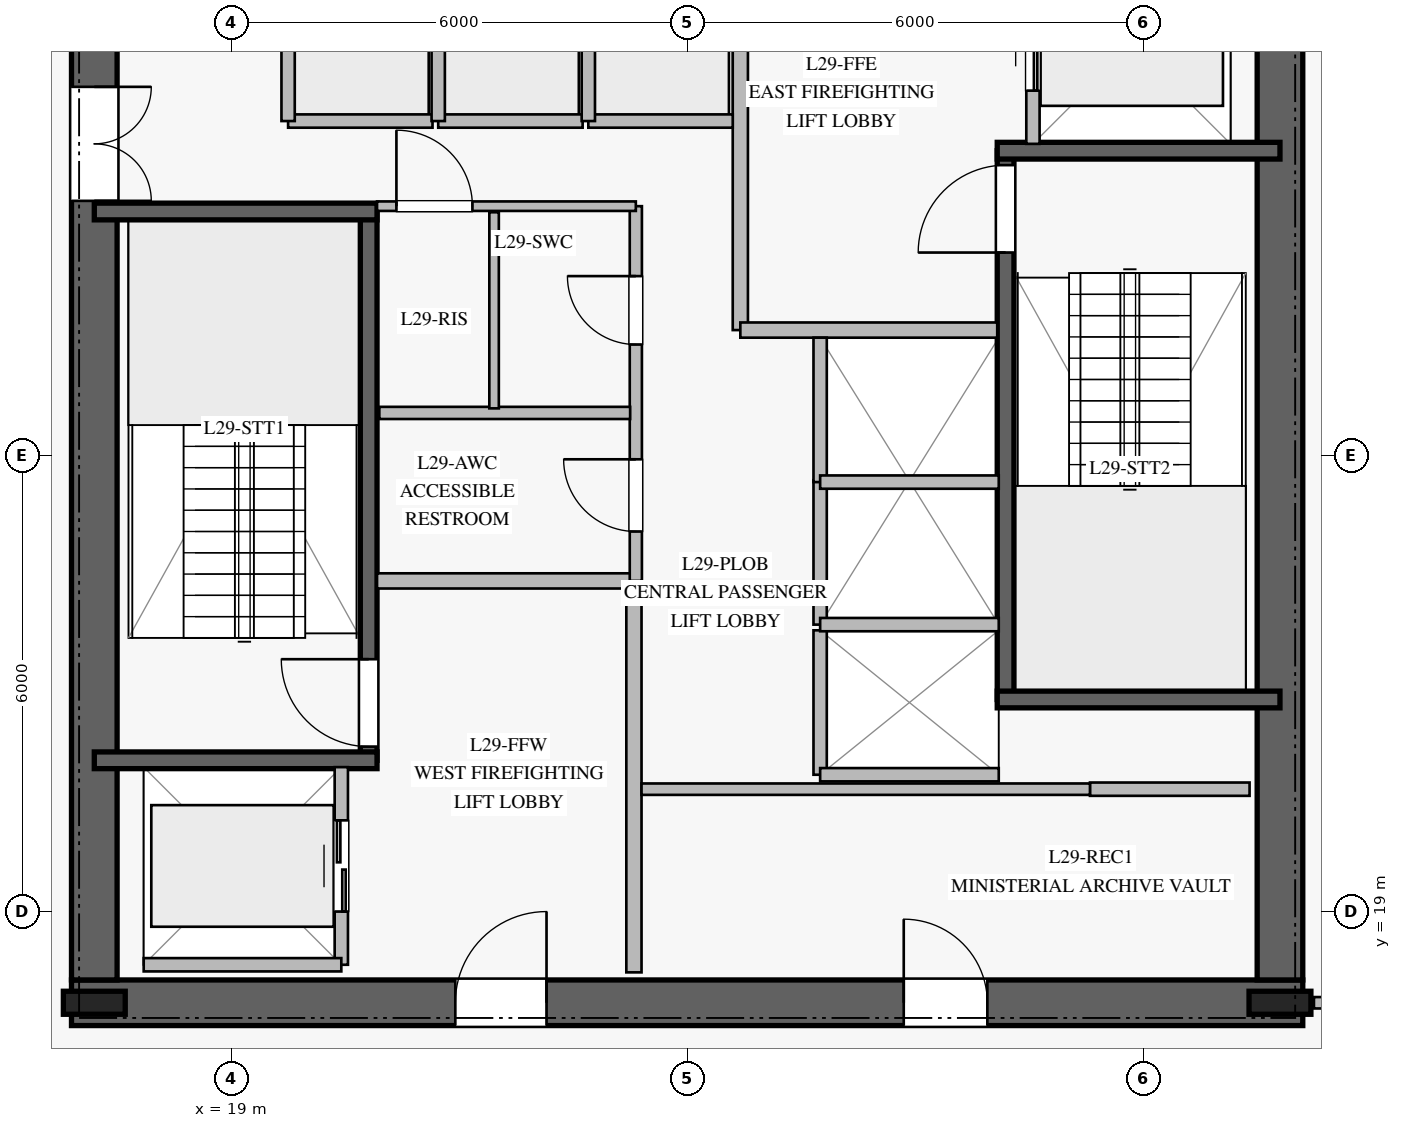
"""IFC4 building model, lengths in metres.
Left out: names, types, materials, properties, quantities, classifications, styles, units other than length and angle.
Written with IfcOpenShell. Run it as: python <this file> out.ifc"""

import sys

from ifc_helpers import new_model, si_unit, direction, frame, frame_2d, origin, origin_2d, place, context, subcontext, project, spatial, rectangle, i_section, extrude, element, fill, save


model = new_model("IFC4")
c1 = context("Model", 3, precision=1e-05, world=origin(), true_north=direction((0.0, 1.0)))
c2 = subcontext(c1, "Body", "Model", "MODEL_VIEW")
j1 = project(units=[si_unit("LENGTHUNIT", "METRE"), si_unit("PLANEANGLEUNIT", "RADIAN")], contexts=[c1])
p1 = place(None, origin())
s1 = spatial("IfcSite", under=j1, at=p1, CompositionType="ELEMENT")
p2 = place(p1, origin())
s2 = spatial("IfcBuilding", under=s1, at=p2, CompositionType="ELEMENT")
p3 = place(p2, frame((0.0, 0.0, 122.4)))
s3 = spatial("IfcBuildingStorey", under=s2, at=p3, CompositionType="ELEMENT", Elevation=122.4)
p4 = place(p3, frame((16.9, 17.8, 0.0), z_axis=(0.0, 0.0, 1.0), x_axis=(1.0, 0.0, 0.0)))
e1 = element("IfcWall", 1, at=p4, inside=s3, PredefinedType="SHEAR", context=c2, shape_type="SweptSolid", body=[
    extrude(rectangle(XDim=16.2, YDim=0.6, at=frame_2d((8.1, 0.0))), origin(), (0.0, 0.0, 1.0), 3.76),
])
p5 = place(p4, frame((5.05, 0.0, 0.0)))
e2 = element("IfcOpeningElement", 2, at=p5, cuts=e1, PredefinedType="OPENING", context=c2, shape_type="SweptSolid", body=[
    extrude(rectangle(XDim=1.2, YDim=2.25, at=frame_2d((0.6, 1.125))), frame((0.0, 0.31, 0.0), z_axis=(0.0, -1.0, 0.0), x_axis=(1.0, 0.0, 0.0)), (0.0, 0.0, 1.0), 0.62),
])
p6 = place(p4, frame((10.95, 0.0, 0.0)))
e3 = element("IfcOpeningElement", 3, at=p6, cuts=e1, PredefinedType="OPENING", context=c2, shape_type="SweptSolid", body=[
    extrude(rectangle(XDim=1.1, YDim=2.2, at=frame_2d((0.55, 1.1))), frame((0.0, 0.31, 0.0), z_axis=(0.0, -1.0, 0.0), x_axis=(1.0, 0.0, 0.0)), (0.0, 0.0, 1.0), 0.62),
])
p7 = place(p3, frame((17.2, 31.9, 0.0), z_axis=(0.0, 0.0, 1.0), x_axis=(0.0, -1.0, 0.0)))
e4 = element("IfcWall", 4, at=p7, inside=s3, PredefinedType="SHEAR", context=c2, shape_type="SweptSolid", body=[
    extrude(rectangle(XDim=13.8, YDim=0.6, at=frame_2d((6.9, 0.0))), origin(), (0.0, 0.0, 1.0), 3.76),
])
p8 = place(p7, frame((2.05, 0.0, 0.0)))
e5 = element("IfcOpeningElement", 5, at=p8, cuts=e4, PredefinedType="OPENING", context=c2, shape_type="SweptSolid", body=[
    extrude(rectangle(XDim=1.5, YDim=2.2, at=frame_2d((0.75, 1.1))), frame((0.0, 0.31, 0.0), z_axis=(0.0, -1.0, 0.0), x_axis=(1.0, 0.0, 0.0)), (0.0, 0.0, 1.0), 0.62),
])
p9 = place(p3, frame((32.8, 18.1, 0.0), z_axis=(0.0, 0.0, 1.0), x_axis=(0.0, 1.0, 0.0)))
e6 = element("IfcWall", 6, at=p9, inside=s3, PredefinedType="SHEAR", context=c2, shape_type="SweptSolid", body=[
    extrude(rectangle(XDim=13.8, YDim=0.6, at=frame_2d((6.9, 0.0))), origin(), (0.0, 0.0, 1.0), 3.76),
])
for number, where, z_axis, x_axis in (
    (7, (17.2, 17.8, 0.0), (0.0, 0.0, 1.0), (1.0, 0.0, 0.0)),
    (8, (32.8, 17.8, 0.0), (0.0, 0.0, 1.0), (1.0, 0.0, 0.0)),
):
    element("IfcColumn", number, at=place(p3, frame(where, z_axis=z_axis, x_axis=x_axis)), inside=s3, PredefinedType="COLUMN", context=c2, shape_type="SweptSolid", body=[
        extrude(i_section(OverallWidth=0.303, OverallDepth=0.814, WebThickness=0.021, FlangeThickness=0.04, at=origin_2d()), origin(), (0.0, 0.0, 1.0), 4.0),
    ])
p10 = place(p3, frame((20.81, 20.99, 0.0), z_axis=(0.0, 0.0, 1.0), x_axis=(0.0, 1.0, 0.0)))
e9 = element("IfcWall", 9, at=p10, inside=s3, PredefinedType="SOLIDWALL", context=c2, shape_type="SweptSolid", body=[
    extrude(rectangle(XDim=7.22, YDim=0.22, at=frame_2d((3.61, 0.0))), origin(), (0.0, 0.0, 1.0), 3.76),
])
p11 = place(p10, frame((0.18, 0.0, 0.0)))
e10 = element("IfcOpeningElement", 10, at=p11, cuts=e9, PredefinedType="OPENING", context=c2, shape_type="SweptSolid", body=[
    extrude(rectangle(XDim=1.15, YDim=2.2, at=frame_2d((0.575, 1.1))), frame((0.0, 0.12, 0.0), z_axis=(0.0, -1.0, 0.0), x_axis=(1.0, 0.0, 0.0)), (0.0, 0.0, 1.0), 0.24),
])
for number, where, z_axis, x_axis in (
    (11, (17.2, 20.99, 0.0), (0.0, 0.0, 1.0), (1.0, 0.0, 0.0)),
    (12, (17.2, 28.21, 0.0), (0.0, 0.0, 1.0), (1.0, 0.0, 0.0)),
):
    element("IfcWall", number, at=place(p3, frame(where, z_axis=z_axis, x_axis=x_axis)), inside=s3, PredefinedType="SOLIDWALL", context=c2, shape_type="SweptSolid", body=[
        extrude(rectangle(XDim=3.72, YDim=0.22, at=frame_2d((1.86, 0.0))), origin(), (0.0, 0.0, 1.0), 3.76),
    ])
p12 = place(p3, frame((29.19, 21.79, 0.0), z_axis=(0.0, 0.0, 1.0), x_axis=(0.0, 1.0, 0.0)))
e13 = element("IfcWall", 13, at=p12, inside=s3, PredefinedType="SOLIDWALL", context=c2, shape_type="SweptSolid", body=[
    extrude(rectangle(XDim=7.22, YDim=0.22, at=frame_2d((3.61, 0.0))), origin(), (0.0, 0.0, 1.0), 3.76),
])
p13 = place(p12, frame((5.88, 0.0, 0.0)))
e14 = element("IfcOpeningElement", 14, at=p13, cuts=e13, PredefinedType="OPENING", context=c2, shape_type="SweptSolid", body=[
    extrude(rectangle(XDim=1.15, YDim=2.2, at=frame_2d((0.575, 1.1))), frame((0.0, 0.12, 0.0), z_axis=(0.0, -1.0, 0.0), x_axis=(1.0, 0.0, 0.0)), (0.0, 0.0, 1.0), 0.24),
])
for number, where, z_axis, x_axis in (
    (15, (29.08, 21.79, 0.0), (0.0, 0.0, 1.0), (1.0, 0.0, 0.0)),
    (16, (29.08, 29.01, 0.0), (0.0, 0.0, 1.0), (1.0, 0.0, 0.0)),
):
    element("IfcWall", number, at=place(p3, frame(where, z_axis=z_axis, x_axis=x_axis)), inside=s3, PredefinedType="SOLIDWALL", context=c2, shape_type="SweptSolid", body=[
        extrude(rectangle(XDim=3.72, YDim=0.22, at=frame_2d((1.86, 0.0))), origin(), (0.0, 0.0, 1.0), 3.76),
    ])
p14 = place(p3, frame((24.3, 18.2, 0.0), z_axis=(0.0, 0.0, 1.0), x_axis=(0.0, 1.0, 0.0)))
e17 = element("IfcWall", 17, at=p14, inside=s3, PredefinedType="PARTITIONING", context=c2, shape_type="SweptSolid", body=[
    extrude(rectangle(XDim=5.15, YDim=0.2, at=frame_2d((2.575, 0.0))), origin(), (0.0, 0.0, 1.0), 3.76),
])
p15 = place(p3, frame((20.92, 23.35, 0.0), z_axis=(0.0, 0.0, 1.0), x_axis=(1.0, 0.0, 0.0)))
e18 = element("IfcWall", 18, at=p15, inside=s3, PredefinedType="PARTITIONING", context=c2, shape_type="SweptSolid", body=[
    extrude(rectangle(XDim=3.38, YDim=0.2, at=frame_2d((1.69, 0.0))), origin(), (0.0, 0.0, 1.0), 3.76),
])
p16 = place(p3, frame((25.7, 26.65, 0.0), z_axis=(0.0, 0.0, 1.0), x_axis=(0.0, 1.0, 0.0)))
e19 = element("IfcWall", 19, at=p16, inside=s3, PredefinedType="PARTITIONING", context=c2, shape_type="SweptSolid", body=[
    extrude(rectangle(XDim=5.15, YDim=0.2, at=frame_2d((2.575, 0.0))), origin(), (0.0, 0.0, 1.0), 3.76),
])
p17 = place(p3, frame((25.7, 26.65, 0.0), z_axis=(0.0, 0.0, 1.0), x_axis=(1.0, 0.0, 0.0)))
e20 = element("IfcWall", 20, at=p17, inside=s3, PredefinedType="PARTITIONING", context=c2, shape_type="SweptSolid", body=[
    extrude(rectangle(XDim=3.38, YDim=0.2, at=frame_2d((1.69, 0.0))), origin(), (0.0, 0.0, 1.0), 3.76),
])
p18 = place(p3, frame((24.325, 23.35, 0.0), z_axis=(0.0, 0.0, 1.0), x_axis=(0.0, 1.0, 0.0)))
e21 = element("IfcWall", 21, at=p18, inside=s3, PredefinedType="PLUMBINGWALL", context=c2, shape_type="SweptSolid", body=[
    extrude(rectangle(XDim=4.93, YDim=0.16, at=frame_2d((2.465, 0.0))), origin(), (0.0, 0.0, 1.0), 3.76),
])
p19 = place(p18, frame((0.65, 0.0, 0.0)))
e22 = element("IfcOpeningElement", 22, at=p19, cuts=e21, PredefinedType="OPENING", context=c2, shape_type="SweptSolid", body=[
    extrude(rectangle(XDim=0.95, YDim=2.1, at=frame_2d((0.475, 1.05))), frame((0.0, 0.09, 0.0), z_axis=(0.0, -1.0, 0.0), x_axis=(1.0, 0.0, 0.0)), (0.0, 0.0, 1.0), 0.18),
])
p20 = place(p18, frame((3.11, 0.0, 0.0)))
e23 = element("IfcOpeningElement", 23, at=p20, cuts=e21, PredefinedType="OPENING", context=c2, shape_type="SweptSolid", body=[
    extrude(rectangle(XDim=0.9, YDim=2.1, at=frame_2d((0.45, 1.05))), frame((0.0, 0.09, 0.0), z_axis=(0.0, -1.0, 0.0), x_axis=(1.0, 0.0, 0.0)), (0.0, 0.0, 1.0), 0.18),
])
p21 = place(p3, frame((20.92, 28.28, 0.0), z_axis=(0.0, 0.0, 1.0), x_axis=(1.0, 0.0, 0.0)))
e24 = element("IfcWall", 24, at=p21, inside=s3, PredefinedType="PARTITIONING", context=c2, shape_type="SweptSolid", body=[
    extrude(rectangle(XDim=3.405, YDim=0.125, at=frame_2d((1.703, 0.0))), origin(), (0.0, 0.0, 1.0), 3.76),
])
p22 = place(p21, frame((0.255, 0.0, 0.0)))
e25 = element("IfcOpeningElement", 25, at=p22, cuts=e24, PredefinedType="OPENING", context=c2, shape_type="SweptSolid", body=[
    extrude(rectangle(XDim=1.0, YDim=2.15, at=frame_2d((0.5, 1.075))), frame((0.0, 0.073, 0.0), z_axis=(0.0, -1.0, 0.0), x_axis=(1.0, 0.0, 0.0)), (0.0, 0.0, 1.0), 0.145),
])
p23 = place(p3, frame((20.95, 25.56, 0.0), z_axis=(0.0, 0.0, 1.0), x_axis=(1.0, 0.0, 0.0)))
e26 = element("IfcWall", 26, at=p23, inside=s3, PredefinedType="PLUMBINGWALL", context=c2, shape_type="SweptSolid", body=[
    extrude(rectangle(XDim=3.3, YDim=0.16, at=frame_2d((1.65, 0.0))), origin(), (0.0, 0.0, 1.0), 3.76),
])
p24 = place(p3, frame((22.46, 25.62, 0.0), z_axis=(0.0, 0.0, 1.0), x_axis=(0.0, 1.0, 0.0)))
e27 = element("IfcWall", 27, at=p24, inside=s3, PredefinedType="PARTITIONING", context=c2, shape_type="SweptSolid", body=[
    extrude(rectangle(XDim=2.58, YDim=0.125, at=frame_2d((1.29, 0.0))), origin(), (0.0, 0.0, 1.0), 3.76),
])
p25 = place(p3, frame((30.3, 20.61, 0.0), z_axis=(0.0, 0.0, 1.0), x_axis=(1.0, 0.0, 0.0)))
e28 = element("IfcWall", 28, at=p25, inside=s3, PredefinedType="PARTITIONING", context=c2, shape_type="SweptSolid", body=[
    extrude(rectangle(XDim=2.1, YDim=0.175, at=frame_2d((1.05, 0.0))), origin(), (0.0, 0.0, 1.0), 3.76),
])
p26 = place(p3, frame((24.4, 20.61, 0.0), z_axis=(0.0, 0.0, 1.0), x_axis=(1.0, 0.0, 0.0)))
e29 = element("IfcWall", 29, at=p26, inside=s3, PredefinedType="PARTITIONING", context=c2, shape_type="SweptSolid", body=[
    extrude(rectangle(XDim=5.9, YDim=0.15, at=frame_2d((2.95, 0.0))), origin(), (0.0, 0.0, 1.0), 3.76),
])
p27 = place(p3, frame((19.75, 29.4, 0.0), z_axis=(0.0, 0.0, 1.0), x_axis=(1.0, 0.0, 0.0)))
e30 = element("IfcWall", 30, at=p27, inside=s3, PredefinedType="PARTITIONING", context=c2, shape_type="SweptSolid", body=[
    extrude(rectangle(XDim=1.9, YDim=0.175, at=frame_2d((0.95, 0.0))), origin(), (0.0, 0.0, 1.0), 3.76),
])
p28 = place(p3, frame((19.75, 29.4, 0.0), z_axis=(0.0, 0.0, 1.0), x_axis=(0.0, 1.0, 0.0)))
e31 = element("IfcWall", 31, at=p28, inside=s3, PredefinedType="PARTITIONING", context=c2, shape_type="SweptSolid", body=[
    extrude(rectangle(XDim=2.35, YDim=0.175, at=frame_2d((1.175, 0.0))), origin(), (0.0, 0.0, 1.0), 3.76),
])
p29 = place(p3, frame((21.725, 29.4, 0.0), z_axis=(0.0, 0.0, 1.0), x_axis=(1.0, 0.0, 0.0)))
e32 = element("IfcWall", 32, at=p29, inside=s3, PredefinedType="PARTITIONING", context=c2, shape_type="SweptSolid", body=[
    extrude(rectangle(XDim=1.9, YDim=0.175, at=frame_2d((0.95, 0.0))), origin(), (0.0, 0.0, 1.0), 3.76),
])
p30 = place(p3, frame((21.725, 29.4, 0.0), z_axis=(0.0, 0.0, 1.0), x_axis=(0.0, 1.0, 0.0)))
e33 = element("IfcWall", 33, at=p30, inside=s3, PredefinedType="PARTITIONING", context=c2, shape_type="SweptSolid", body=[
    extrude(rectangle(XDim=2.35, YDim=0.175, at=frame_2d((1.175, 0.0))), origin(), (0.0, 0.0, 1.0), 3.76),
])
p31 = place(p3, frame((23.7, 29.4, 0.0), z_axis=(0.0, 0.0, 1.0), x_axis=(1.0, 0.0, 0.0)))
e34 = element("IfcWall", 34, at=p31, inside=s3, PredefinedType="PARTITIONING", context=c2, shape_type="SweptSolid", body=[
    extrude(rectangle(XDim=1.9, YDim=0.175, at=frame_2d((0.95, 0.0))), origin(), (0.0, 0.0, 1.0), 3.76),
])
p32 = place(p3, frame((23.7, 29.4, 0.0), z_axis=(0.0, 0.0, 1.0), x_axis=(0.0, 1.0, 0.0)))
e35 = element("IfcWall", 35, at=p32, inside=s3, PredefinedType="PARTITIONING", context=c2, shape_type="SweptSolid", body=[
    extrude(rectangle(XDim=2.35, YDim=0.175, at=frame_2d((1.175, 0.0))), origin(), (0.0, 0.0, 1.0), 3.76),
])
p33 = place(p3, frame((26.75, 20.8, 0.0), z_axis=(0.0, 0.0, 1.0), x_axis=(0.0, 1.0, 0.0)))
e36 = element("IfcWall", 36, at=p33, inside=s3, PredefinedType="PARTITIONING", context=c2, shape_type="SweptSolid", body=[
    extrude(rectangle(XDim=1.9, YDim=0.175, at=frame_2d((0.95, 0.0))), origin(), (0.0, 0.0, 1.0), 3.76),
])
p34 = place(p3, frame((26.75, 20.8, 0.0), z_axis=(0.0, 0.0, 1.0), x_axis=(1.0, 0.0, 0.0)))
e37 = element("IfcWall", 37, at=p34, inside=s3, PredefinedType="PARTITIONING", context=c2, shape_type="SweptSolid", body=[
    extrude(rectangle(XDim=2.35, YDim=0.175, at=frame_2d((1.175, 0.0))), origin(), (0.0, 0.0, 1.0), 3.76),
])
p35 = place(p3, frame((26.75, 22.775, 0.0), z_axis=(0.0, 0.0, 1.0), x_axis=(0.0, 1.0, 0.0)))
e38 = element("IfcWall", 38, at=p35, inside=s3, PredefinedType="PARTITIONING", context=c2, shape_type="SweptSolid", body=[
    extrude(rectangle(XDim=1.9, YDim=0.175, at=frame_2d((0.95, 0.0))), origin(), (0.0, 0.0, 1.0), 3.76),
])
p36 = place(p3, frame((26.75, 22.775, 0.0), z_axis=(0.0, 0.0, 1.0), x_axis=(1.0, 0.0, 0.0)))
e39 = element("IfcWall", 39, at=p36, inside=s3, PredefinedType="PARTITIONING", context=c2, shape_type="SweptSolid", body=[
    extrude(rectangle(XDim=2.35, YDim=0.175, at=frame_2d((1.175, 0.0))), origin(), (0.0, 0.0, 1.0), 3.76),
])
p37 = place(p3, frame((26.75, 24.65, 0.0), z_axis=(0.0, 0.0, 1.0), x_axis=(0.0, 1.0, 0.0)))
e40 = element("IfcWall", 40, at=p37, inside=s3, PredefinedType="PARTITIONING", context=c2, shape_type="SweptSolid", body=[
    extrude(rectangle(XDim=1.9, YDim=0.175, at=frame_2d((0.95, 0.0))), origin(), (0.0, 0.0, 1.0), 3.76),
])
p38 = place(p3, frame((26.75, 24.65, 0.0), z_axis=(0.0, 0.0, 1.0), x_axis=(1.0, 0.0, 0.0)))
e41 = element("IfcWall", 41, at=p38, inside=s3, PredefinedType="PARTITIONING", context=c2, shape_type="SweptSolid", body=[
    extrude(rectangle(XDim=2.35, YDim=0.175, at=frame_2d((1.175, 0.0))), origin(), (0.0, 0.0, 1.0), 3.76),
])
p39 = place(p3, frame((20.45, 18.3, 0.0), z_axis=(0.0, 0.0, 1.0), x_axis=(0.0, 1.0, 0.0)))
e42 = element("IfcWall", 42, at=p39, inside=s3, PredefinedType="PARTITIONING", context=c2, shape_type="SweptSolid", body=[
    extrude(rectangle(XDim=2.6, YDim=0.175, at=frame_2d((1.3, 0.0))), origin(), (0.0, 0.0, 1.0), 3.76),
])
p40 = place(p39, frame((0.7, 0.0, 0.0)))
e43 = element("IfcOpeningElement", 43, at=p40, cuts=e42, PredefinedType="OPENING", context=c2, shape_type="SweptSolid", body=[
    extrude(rectangle(XDim=1.2, YDim=2.2, at=frame_2d((0.6, 1.1))), frame((0.0, 0.098, 0.0), z_axis=(0.0, -1.0, 0.0), x_axis=(1.0, 0.0, 0.0)), (0.0, 0.0, 1.0), 0.195),
])
p41 = place(p3, frame((17.85, 18.3, 0.0), z_axis=(0.0, 0.0, 1.0), x_axis=(1.0, 0.0, 0.0)))
e44 = element("IfcWall", 44, at=p41, inside=s3, PredefinedType="PARTITIONING", context=c2, shape_type="SweptSolid", body=[
    extrude(rectangle(XDim=2.6, YDim=0.175, at=frame_2d((1.3, 0.0))), origin(), (0.0, 0.0, 1.0), 3.76),
])
p42 = place(p3, frame((29.55, 29.1, 0.0), z_axis=(0.0, 0.0, 1.0), x_axis=(0.0, 1.0, 0.0)))
e45 = element("IfcWall", 45, at=p42, inside=s3, PredefinedType="PARTITIONING", context=c2, shape_type="SweptSolid", body=[
    extrude(rectangle(XDim=2.6, YDim=0.175, at=frame_2d((1.3, 0.0))), origin(), (0.0, 0.0, 1.0), 3.76),
])
p43 = place(p42, frame((0.7, 0.0, 0.0)))
e46 = element("IfcOpeningElement", 46, at=p43, cuts=e45, PredefinedType="OPENING", context=c2, shape_type="SweptSolid", body=[
    extrude(rectangle(XDim=1.2, YDim=2.2, at=frame_2d((0.6, 1.1))), frame((0.0, 0.098, 0.0), z_axis=(0.0, -1.0, 0.0), x_axis=(1.0, 0.0, 0.0)), (0.0, 0.0, 1.0), 0.195),
])
p44 = place(p3, frame((33.247, 17.8, 0.0), z_axis=(0.0, 0.0, 1.0), x_axis=(1.0, 0.0, 0.0)))
e47 = element("IfcWall", 47, at=p44, inside=s3, PredefinedType="PARTITIONING", context=c2, shape_type="SweptSolid", body=[
    extrude(rectangle(XDim=7.953, YDim=0.15, at=frame_2d((3.977, 0.0))), origin(), (0.0, 0.0, 1.0), 3.05),
])
p45 = place(p11, origin())
e48 = element("IfcDoor", 48, at=p45, inside=s3, OperationType="SINGLE_SWING_RIGHT", PredefinedType="DOOR", context=c2, shape_type="SweptSolid", body=[
    extrude(rectangle(XDim=1.15, YDim=2.2, at=frame_2d((0.575, 1.1))), frame((0.0, 0.025, 0.0), z_axis=(0.0, -1.0, 0.0), x_axis=(1.0, 0.0, 0.0)), (0.0, 0.0, 1.0), 0.05),
])
fill(e10, e48)
p46 = place(p13, origin())
e49 = element("IfcDoor", 49, at=p46, inside=s3, OperationType="SINGLE_SWING_LEFT", PredefinedType="DOOR", context=c2, shape_type="SweptSolid", body=[
    extrude(rectangle(XDim=1.15, YDim=2.2, at=frame_2d((0.575, 1.1))), frame((0.0, 0.025, 0.0), z_axis=(0.0, -1.0, 0.0), x_axis=(1.0, 0.0, 0.0)), (0.0, 0.0, 1.0), 0.05),
])
fill(e14, e49)
p47 = place(p5, origin())
e50 = element("IfcDoor", 50, at=p47, inside=s3, OperationType="SINGLE_SWING_RIGHT", PredefinedType="DOOR", context=c2, shape_type="SweptSolid", body=[
    extrude(rectangle(XDim=1.2, YDim=2.25, at=frame_2d((0.6, 1.125))), frame((0.0, 0.025, 0.0), z_axis=(0.0, -1.0, 0.0), x_axis=(1.0, 0.0, 0.0)), (0.0, 0.0, 1.0), 0.05),
])
fill(e2, e50)
p48 = place(p8, origin())
e51 = element("IfcDoor", 51, at=p48, inside=s3, OperationType="DOUBLE_DOOR_SINGLE_SWING", PredefinedType="DOOR", context=c2, shape_type="SweptSolid", body=[
    extrude(rectangle(XDim=1.5, YDim=2.2, at=frame_2d((0.75, 1.1))), frame((0.0, 0.025, 0.0), z_axis=(0.0, -1.0, 0.0), x_axis=(1.0, 0.0, 0.0)), (0.0, 0.0, 1.0), 0.05),
])
fill(e5, e51)
p49 = place(p19, origin())
e52 = element("IfcDoor", 52, at=p49, inside=s3, OperationType="SINGLE_SWING_RIGHT", PredefinedType="DOOR", context=c2, shape_type="SweptSolid", body=[
    extrude(rectangle(XDim=0.95, YDim=2.1, at=frame_2d((0.475, 1.05))), frame((0.0, 0.025, 0.0), z_axis=(0.0, -1.0, 0.0), x_axis=(1.0, 0.0, 0.0)), (0.0, 0.0, 1.0), 0.05),
])
fill(e22, e52)
p50 = place(p22, origin())
e53 = element("IfcDoor", 53, at=p50, inside=s3, OperationType="SINGLE_SWING_LEFT", PredefinedType="DOOR", context=c2, shape_type="SweptSolid", body=[
    extrude(rectangle(XDim=1.0, YDim=2.15, at=frame_2d((0.5, 1.075))), frame((0.0, 0.025, 0.0), z_axis=(0.0, -1.0, 0.0), x_axis=(1.0, 0.0, 0.0)), (0.0, 0.0, 1.0), 0.05),
])
fill(e25, e53)
p51 = place(p20, origin())
e54 = element("IfcDoor", 54, at=p51, inside=s3, OperationType="SINGLE_SWING_RIGHT", PredefinedType="DOOR", context=c2, shape_type="SweptSolid", body=[
    extrude(rectangle(XDim=0.9, YDim=2.1, at=frame_2d((0.45, 1.05))), frame((0.0, 0.025, 0.0), z_axis=(0.0, -1.0, 0.0), x_axis=(1.0, 0.0, 0.0)), (0.0, 0.0, 1.0), 0.05),
])
fill(e23, e54)
p52 = place(p6, origin())
e55 = element("IfcDoor", 55, at=p52, inside=s3, OperationType="SINGLE_SWING_LEFT", PredefinedType="DOOR", context=c2, shape_type="SweptSolid", body=[
    extrude(rectangle(XDim=1.1, YDim=2.2, at=frame_2d((0.55, 1.1))), frame((0.0, 0.025, 0.0), z_axis=(0.0, -1.0, 0.0), x_axis=(1.0, 0.0, 0.0)), (0.0, 0.0, 1.0), 0.05),
])
fill(e3, e55)
p53 = place(p40, origin())
e56 = element("IfcDoor", 56, at=p53, inside=s3, OperationType="DOUBLE_DOOR_SLIDING", PredefinedType="DOOR", context=c2, shape_type="SweptSolid", body=[
    extrude(rectangle(XDim=1.2, YDim=2.2, at=frame_2d((0.6, 1.1))), frame((0.0, 0.025, 0.0), z_axis=(0.0, -1.0, 0.0), x_axis=(1.0, 0.0, 0.0)), (0.0, 0.0, 1.0), 0.05),
])
fill(e43, e56)
p54 = place(p43, origin())
e57 = element("IfcDoor", 57, at=p54, inside=s3, OperationType="DOUBLE_DOOR_SLIDING", PredefinedType="DOOR", context=c2, shape_type="SweptSolid", body=[
    extrude(rectangle(XDim=1.2, YDim=2.2, at=frame_2d((0.6, 1.1))), frame((0.0, 0.025, 0.0), z_axis=(0.0, -1.0, 0.0), x_axis=(1.0, 0.0, 0.0)), (0.0, 0.0, 1.0), 0.05),
])
fill(e46, e57)
save(model, sys.argv[1])
